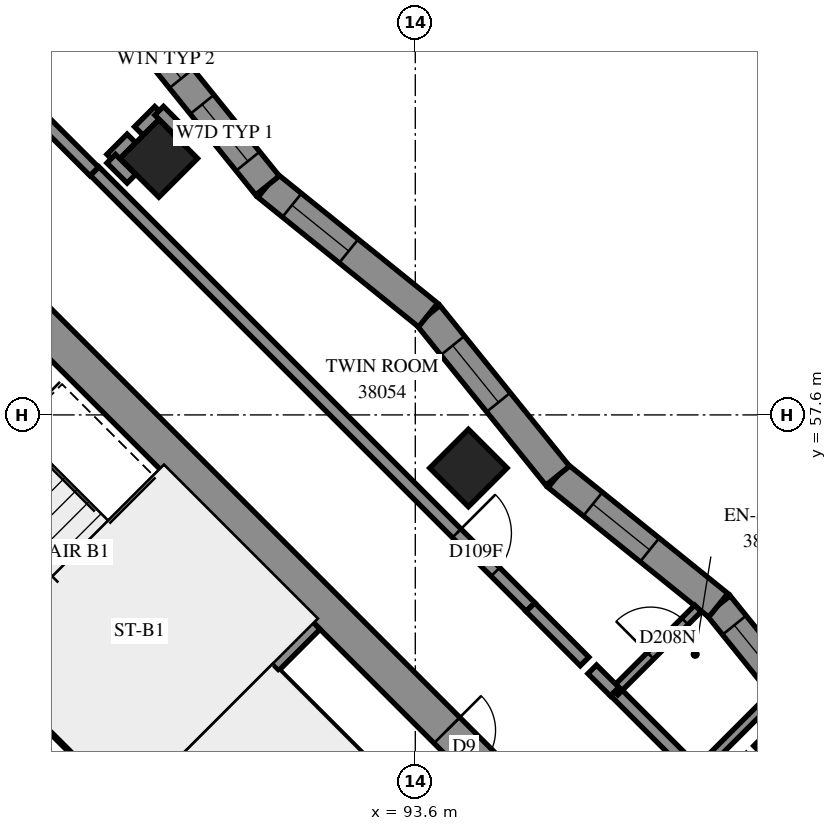
"""IFC4 building model, lengths in metres.
Left out: names, types, materials, properties, quantities, classifications, styles, units other than length and angle.
Written with IfcOpenShell. Run it as: python <this file> out.ifc"""

import sys

from ifc_helpers import new_model, si_unit, direction, frame, frame_2d, origin, origin_2d, place, context, subcontext, project, spatial, polyline, rectangle, outline, extrude, element, fill, save


model = new_model("IFC4")
c1 = context("Model", 3, precision=1e-05, world=origin(), true_north=direction((0.0, 1.0)))
c2 = subcontext(c1, "Body", "Model", "MODEL_VIEW")
j1 = project(units=[si_unit("LENGTHUNIT", "METRE"), si_unit("PLANEANGLEUNIT", "RADIAN")], contexts=[c1])
p1 = place(None, origin())
s1 = spatial("IfcSite", under=j1, at=p1, CompositionType="ELEMENT")
p2 = place(p1, origin())
s2 = spatial("IfcBuilding", under=s1, at=p2, CompositionType="ELEMENT")
p3 = place(p2, frame((0.0, 0.0, 142.2)))
s3 = spatial("IfcBuildingStorey", under=s2, at=p3, CompositionType="ELEMENT", Elevation=142.2)
for number, where, z_axis, x_axis in (
    (1, (89.382, 61.818, 0.0), (0.0, 0.0, 1.0), (0.707, -0.707, 0.0)),
    (2, (94.474, 56.727, 0.0), (0.0, 0.0, 1.0), (0.707, -0.707, 0.0)),
    (3, (99.565, 51.635, 0.0), (0.0, 0.0, 1.0), (0.707, -0.707, 0.0)),
):
    element("IfcColumn", number, at=place(p3, frame(where, z_axis=z_axis, x_axis=x_axis)), inside=s3, PredefinedType="COLUMN", context=c2, shape_type="SweptSolid", body=[
        extrude(rectangle(XDim=0.9, YDim=0.9, at=origin_2d()), origin(), (0.0, 0.0, 1.0), 3.1),
    ])
p4 = place(p3, frame((86.625, 59.908, -0.3), z_axis=(0.0, 0.0, 1.0), x_axis=(0.7071067812, -0.7071067812, 0.0)))
e4 = element("IfcWall", 4, at=p4, inside=s3, PredefinedType="SHEAR", context=c2, shape_type="SweptSolid", body=[
    extrude(rectangle(XDim=15.6, YDim=0.6, at=frame_2d((7.8, 0.0))), origin(), (0.0, 0.0, 1.0), 2.7),
])
p5 = place(p4, frame((10.6, 0.0, 0.3)))
e5 = element("IfcOpeningElement", 5, at=p5, cuts=e4, PredefinedType="OPENING", context=c2, shape_type="SweptSolid", body=[
    extrude(rectangle(XDim=0.8, YDim=2.1, at=frame_2d((0.4, 1.05))), frame((0.0, 0.31, 0.0), z_axis=(0.0, -1.0, 0.0), x_axis=(1.0, 0.0, 0.0)), (0.0, 0.0, 1.0), 0.62),
])
p6 = place(p3, frame((81.534, 53.969, 0.0), z_axis=(0.0, 0.0, 1.0), x_axis=(0.707103309, -0.7071102534, 0.0)))
e6 = element("IfcWall", 6, at=p6, inside=s3, PredefinedType="SOLIDWALL", context=c2, shape_type="SweptSolid", body=[
    extrude(rectangle(XDim=14.4, YDim=0.3, at=frame_2d((7.2, 0.0))), origin(), (0.0, 0.0, 1.0), 3.1),
])
p7 = place(p6, frame((1.25, 0.0, 0.0)))
e7 = element("IfcOpeningElement", 7, at=p7, cuts=e6, PredefinedType="OPENING", context=c2, shape_type="SweptSolid", body=[
    extrude(rectangle(XDim=1.1, YDim=2.1, at=frame_2d((0.55, 1.05))), frame((0.0, 0.16, 0.0), z_axis=(0.0, -1.0, 0.0), x_axis=(1.0, 0.0, 0.0)), (0.0, 0.0, 1.0), 0.32),
])
p8 = place(p6, frame((4.85, 0.0, 0.0)))
e8 = element("IfcOpeningElement", 8, at=p8, cuts=e6, PredefinedType="OPENING", context=c2, shape_type="SweptSolid", body=[
    extrude(rectangle(XDim=1.1, YDim=2.1, at=frame_2d((0.55, 1.05))), frame((0.0, 0.16, 0.0), z_axis=(0.0, -1.0, 0.0), x_axis=(1.0, 0.0, 0.0)), (0.0, 0.0, 1.0), 0.32),
])
p9 = place(p6, frame((8.45, 0.0, 0.0)))
e9 = element("IfcOpeningElement", 9, at=p9, cuts=e6, PredefinedType="OPENING", context=c2, shape_type="SweptSolid", body=[
    extrude(rectangle(XDim=1.1, YDim=2.1, at=frame_2d((0.55, 1.05))), frame((0.0, 0.16, 0.0), z_axis=(0.0, -1.0, 0.0), x_axis=(1.0, 0.0, 0.0)), (0.0, 0.0, 1.0), 0.32),
])
p10 = place(p6, frame((12.05, 0.0, 0.0)))
e10 = element("IfcOpeningElement", 10, at=p10, cuts=e6, PredefinedType="OPENING", context=c2, shape_type="SweptSolid", body=[
    extrude(rectangle(XDim=1.1, YDim=2.1, at=frame_2d((0.55, 1.05))), frame((0.0, 0.16, 0.0), z_axis=(0.0, -1.0, 0.0), x_axis=(1.0, 0.0, 0.0)), (0.0, 0.0, 1.0), 0.32),
])
p11 = place(p3, frame((83.867, 56.302, 0.0), z_axis=(0.0, 0.0, 1.0), x_axis=(0.7071137256, -0.7070998367, 0.0)))
e11 = element("IfcWall", 11, at=p11, inside=s3, PredefinedType="SOLIDWALL", context=c2, shape_type="SweptSolid", body=[
    extrude(rectangle(XDim=7.2, YDim=0.3, at=frame_2d((3.6, 0.0))), origin(), (0.0, 0.0, 1.0), 3.1),
])
p12 = place(p3, frame((88.958, 51.211, 0.0), z_axis=(0.0, 0.0, 1.0), x_axis=(0.7071067812, 0.7071067812, 0.0)))
e12 = element("IfcWall", 12, at=p12, inside=s3, PredefinedType="SOLIDWALL", context=c2, shape_type="SweptSolid", body=[
    extrude(rectangle(XDim=4.2, YDim=0.3, at=frame_2d((2.1, 0.0))), origin(), (0.0, 0.0, 1.0), 3.1),
])
p13 = place(p3, frame((100.714, 51.828, 0.0), z_axis=(0.0, 0.0, 1.0), x_axis=(-0.6278699325, 0.7783182818, 0.0)))
e13 = element("IfcWall", 13, at=p13, inside=s3, PredefinedType="SOLIDWALL", context=c2, shape_type="SweptSolid", body=[
    extrude(outline(polyline([(0.027, -0.25), (3.421, -0.25), (3.367, 0.25), (-0.027, 0.25), (0.027, -0.25)])), origin(), (0.0, 0.0, 1.0), 3.1),
])
p14 = place(p13, frame((1.774, 0.0, 0.45)))
e14 = element("IfcOpeningElement", 14, at=p14, cuts=e13, PredefinedType="OPENING", context=c2, shape_type="SweptSolid", body=[
    extrude(rectangle(XDim=1.2, YDim=2.5, at=frame_2d((0.6, 1.25))), frame((0.0, 0.26, 0.0), z_axis=(0.0, -1.0, 0.0), x_axis=(1.0, 0.0, 0.0)), (0.0, 0.0, 1.0), 0.52),
])
p15 = place(p3, frame((98.583, 54.469, 0.0), z_axis=(0.0, 0.0, 1.0), x_axis=(-0.7783182818, 0.6278699325, 0.0)))
e15 = element("IfcWall", 15, at=p15, inside=s3, PredefinedType="SOLIDWALL", context=c2, shape_type="SweptSolid", body=[
    extrude(outline(polyline([(-0.027, -0.25), (3.367, -0.25), (3.421, 0.25), (0.027, 0.25), (-0.027, -0.25)])), origin(), (0.0, 0.0, 1.0), 3.1),
])
p16 = place(p15, frame((1.45, 0.0, 0.45)))
e16 = element("IfcOpeningElement", 16, at=p16, cuts=e15, PredefinedType="OPENING", context=c2, shape_type="SweptSolid", body=[
    extrude(rectangle(XDim=1.2, YDim=2.5, at=frame_2d((0.6, 1.25))), frame((0.0, 0.26, 0.0), z_axis=(0.0, -1.0, 0.0), x_axis=(1.0, 0.0, 0.0)), (0.0, 0.0, 1.0), 0.52),
])
p17 = place(p3, frame((95.941, 56.6, 0.0), z_axis=(0.0, 0.0, 1.0), x_axis=(-0.6278699325, 0.7783182818, 0.0)))
e17 = element("IfcWall", 17, at=p17, inside=s3, PredefinedType="SOLIDWALL", context=c2, shape_type="SweptSolid", body=[
    extrude(outline(polyline([(0.027, -0.25), (3.421, -0.25), (3.367, 0.25), (-0.027, 0.25), (0.027, -0.25)])), origin(), (0.0, 0.0, 1.0), 3.1),
])
p18 = place(p17, frame((1.55, 0.0, 0.45)))
e18 = element("IfcOpeningElement", 18, at=p18, cuts=e17, PredefinedType="OPENING", context=c2, shape_type="SweptSolid", body=[
    extrude(rectangle(XDim=1.2, YDim=2.5, at=frame_2d((0.6, 1.25))), frame((0.0, 0.26, 0.0), z_axis=(0.0, -1.0, 0.0), x_axis=(1.0, 0.0, 0.0)), (0.0, 0.0, 1.0), 0.52),
])
p19 = place(p3, frame((93.81, 59.242, 0.0), z_axis=(0.0, 0.0, 1.0), x_axis=(-0.7783182818, 0.6278699325, 0.0)))
e19 = element("IfcWall", 19, at=p19, inside=s3, PredefinedType="SOLIDWALL", context=c2, shape_type="SweptSolid", body=[
    extrude(outline(polyline([(-0.027, -0.25), (3.367, -0.25), (3.421, 0.25), (0.027, 0.25), (-0.027, -0.25)])), origin(), (0.0, 0.0, 1.0), 3.1),
])
p20 = place(p19, frame((1.677, 0.0, 0.45)))
e20 = element("IfcOpeningElement", 20, at=p20, cuts=e19, PredefinedType="OPENING", context=c2, shape_type="SweptSolid", body=[
    extrude(rectangle(XDim=1.2, YDim=2.5, at=frame_2d((0.6, 1.25))), frame((0.0, 0.26, 0.0), z_axis=(0.0, -1.0, 0.0), x_axis=(1.0, 0.0, 0.0)), (0.0, 0.0, 1.0), 0.52),
])
p21 = place(p3, frame((91.169, 61.373, 0.0), z_axis=(0.0, 0.0, 1.0), x_axis=(-0.6278699325, 0.7783182818, 0.0)))
e21 = element("IfcWall", 21, at=p21, inside=s3, PredefinedType="SOLIDWALL", context=c2, shape_type="SweptSolid", body=[
    extrude(outline(polyline([(0.027, -0.25), (3.421, -0.25), (3.367, 0.25), (-0.027, 0.25), (0.027, -0.25)])), origin(), (0.0, 0.0, 1.0), 3.1),
])
p22 = place(p21, frame((0.512, 0.0, 0.5)))
e22 = element("IfcOpeningElement", 22, at=p22, cuts=e21, PredefinedType="OPENING", context=c2, shape_type="SweptSolid", body=[
    extrude(rectangle(XDim=1.2, YDim=2.45, at=frame_2d((0.6, 1.225))), frame((0.0, 0.26, 0.0), z_axis=(0.0, -1.0, 0.0), x_axis=(1.0, 0.0, 0.0)), (0.0, 0.0, 1.0), 0.52),
])
p23 = place(p21, frame((2.259, 0.0, 0.45)))
e23 = element("IfcOpeningElement", 23, at=p23, cuts=e21, PredefinedType="OPENING", context=c2, shape_type="SweptSolid", body=[
    extrude(rectangle(XDim=0.8, YDim=2.5, at=frame_2d((0.4, 1.25))), frame((0.0, 0.26, 0.0), z_axis=(0.0, -1.0, 0.0), x_axis=(1.0, 0.0, 0.0)), (0.0, 0.0, 1.0), 0.52),
])
p24 = place(p3, frame((91.313, 53.354, 0.0), z_axis=(0.0, 0.0, 1.0), x_axis=(0.7071140275, -0.7070995348, 0.0)))
e24 = element("IfcWall", 24, at=p24, inside=s3, PredefinedType="PARTITIONING", context=c2, shape_type="SweptSolid", body=[
    extrude(rectangle(XDim=6.9, YDim=0.15, at=frame_2d((3.45, 0.0))), origin(), (0.0, 0.0, 1.0), 3.1),
])
p25 = place(p3, frame((88.326, 61.609, 0.0), z_axis=(0.0, 0.0, 1.0), x_axis=(0.7071067812, -0.7071067812, 0.0)))
e25 = element("IfcWall", 25, at=p25, inside=s3, PredefinedType="PARTITIONING", context=c2, shape_type="SweptSolid", body=[
    extrude(rectangle(XDim=10.14, YDim=0.2, at=frame_2d((5.07, 0.0))), origin(), (0.0, 0.0, 1.0), 3.1),
])
p26 = place(p25, frame((8.422, 0.0, 0.0)))
e26 = element("IfcOpeningElement", 26, at=p26, cuts=e25, PredefinedType="OPENING", context=c2, shape_type="SweptSolid", body=[
    extrude(rectangle(XDim=0.9, YDim=2.1, at=frame_2d((0.45, 1.05))), frame((0.0, 0.11, 0.0), z_axis=(0.0, -1.0, 0.0), x_axis=(1.0, 0.0, 0.0)), (0.0, 0.0, 1.0), 0.22),
])
p27 = place(p3, frame((96.882, 53.053, 0.0), z_axis=(0.0, 0.0, 1.0), x_axis=(0.7071067812, -0.7071067812, 0.0)))
e27 = element("IfcWall", 27, at=p27, inside=s3, PredefinedType="PARTITIONING", context=c2, shape_type="SweptSolid", body=[
    extrude(rectangle(XDim=2.86, YDim=0.2, at=frame_2d((1.43, 0.0))), origin(), (0.0, 0.0, 1.0), 3.1),
])
p28 = place(p3, frame((86.834, 63.088, 0.0), z_axis=(0.0, 0.0, 1.0), x_axis=(0.7075827869, -0.7066304548, 0.0)))
e28 = element("IfcWall", 28, at=p28, inside=s3, PredefinedType="PARTITIONING", context=c2, shape_type="SweptSolid", body=[
    extrude(rectangle(XDim=2.1, YDim=0.2, at=frame_2d((1.05, 0.0))), origin(), (0.0, 0.0, 1.0), 3.1),
])
p29 = place(p3, frame((96.878, 53.05, 0.0), z_axis=(0.0, 0.0, 1.0), x_axis=(0.7076230681, 0.7065901171, 0.0)))
e29 = element("IfcWall", 29, at=p29, inside=s3, PredefinedType="PARTITIONING", context=c2, shape_type="SweptSolid", body=[
    extrude(rectangle(XDim=1.936, YDim=0.15, at=frame_2d((0.968, 0.0))), origin(), (0.0, 0.0, 1.0), 3.1),
])
p30 = place(p29, frame((0.834, 0.0, 0.0)))
e30 = element("IfcOpeningElement", 30, at=p30, cuts=e29, PredefinedType="OPENING", context=c2, shape_type="SweptSolid", body=[
    extrude(rectangle(XDim=0.8, YDim=2.1, at=frame_2d((0.4, 1.05))), frame((0.0, 0.085, 0.0), z_axis=(0.0, -1.0, 0.0), x_axis=(1.0, 0.0, 0.0)), (0.0, 0.0, 1.0), 0.17),
])
p31 = place(p3, frame((98.221, 51.707, 0.0), z_axis=(0.0, 0.0, 1.0), x_axis=(0.7071349331, 0.7070786281, 0.0)))
e31 = element("IfcWall", 31, at=p31, inside=s3, PredefinedType="PARTITIONING", context=c2, shape_type="SweptSolid", body=[
    extrude(rectangle(XDim=1.776, YDim=0.15, at=frame_2d((0.888, 0.0))), origin(), (0.0, 0.0, 1.0), 3.1),
])
p32 = place(p3, frame((95.494, 54.438, 0.0), z_axis=(0.0, 0.0, 1.0), x_axis=(0.706312726, -0.7078999456, 0.0)))
e32 = element("IfcWall", 32, at=p32, inside=s3, PredefinedType="PARTITIONING", context=c2, shape_type="SweptSolid", body=[
    extrude(rectangle(XDim=1.26, YDim=0.2, at=frame_2d((0.63, 0.0))), origin(), (0.0, 0.0, 1.0), 3.1),
])
p33 = place(p3, frame((96.51, 53.416, 0.0), z_axis=(0.0, 0.0, 1.0), x_axis=(0.7090308706, -0.7051774419, 0.0)))
e33 = element("IfcWall", 33, at=p33, inside=s3, PredefinedType="PARTITIONING", context=c2, shape_type="SweptSolid", body=[
    extrude(rectangle(XDim=0.519, YDim=0.2, at=frame_2d((0.26, 0.0))), origin(), (0.0, 0.0, 1.0), 3.1),
])
for number, where, z_axis, x_axis in (
    (34, (88.6, 61.814, 0.0), (0.0, 0.0, 1.0), (0.707, 0.707, 0.0)),
    (35, (89.054, 62.268, 0.0), (0.0, 0.0, 1.0), (0.707, 0.707, 0.0)),
):
    element("IfcWall", number, at=place(p3, frame(where, z_axis=z_axis, x_axis=x_axis)), inside=s3, PredefinedType="PARTITIONING", context=c2, shape_type="SweptSolid", body=[
        extrude(rectangle(XDim=0.469, YDim=0.2, at=frame_2d((0.235, 0.0))), origin(), (0.0, 0.0, 1.0), 3.1),
    ])
for number, where, z_axis, x_axis in (
    (36, (88.599, 61.813, 0.0), (0.0, 0.0, 1.0), (0.709, -0.705, 0.0)),
    (37, (89.388, 62.602, 0.0), (0.0, 0.0, 1.0), (0.705, -0.709, 0.0)),
):
    element("IfcWall", number, at=place(p3, frame(where, z_axis=z_axis, x_axis=x_axis)), inside=s3, PredefinedType="PARTITIONING", context=c2, shape_type="SweptSolid", body=[
        extrude(rectangle(XDim=0.468, YDim=0.2, at=frame_2d((0.234, 0.0))), origin(), (0.0, 0.0, 1.0), 3.1),
    ])
p34 = place(p3, frame((99.237, 52.087, 0.0), z_axis=(0.0, 0.0, 1.0), x_axis=(0.7071742693, 0.7070392866, 0.0)))
e38 = element("IfcWall", 38, at=p34, inside=s3, PredefinedType="PARTITIONING", context=c2, shape_type="SweptSolid", body=[
    extrude(rectangle(XDim=0.741, YDim=0.2, at=frame_2d((0.37, 0.0))), origin(), (0.0, 0.0, 1.0), 3.1),
])
p35 = place(p14, origin())
e39 = element("IfcWindow", 39, at=p35, inside=s3, PartitioningType="SINGLE_PANEL", PredefinedType="WINDOW", context=c2, shape_type="SweptSolid", body=[
    extrude(rectangle(XDim=1.2, YDim=2.5, at=frame_2d((0.6, 1.25))), frame((0.0, 0.18, 0.0), z_axis=(0.0, -1.0, 0.0), x_axis=(1.0, 0.0, 0.0)), (0.0, 0.0, 1.0), 0.06),
])
fill(e14, e39)
p36 = place(p16, origin())
e40 = element("IfcWindow", 40, at=p36, inside=s3, PartitioningType="SINGLE_PANEL", PredefinedType="WINDOW", context=c2, shape_type="SweptSolid", body=[
    extrude(rectangle(XDim=1.2, YDim=2.5, at=frame_2d((0.6, 1.25))), frame((0.0, 0.18, 0.0), z_axis=(0.0, -1.0, 0.0), x_axis=(1.0, 0.0, 0.0)), (0.0, 0.0, 1.0), 0.06),
])
fill(e16, e40)
p37 = place(p18, origin())
e41 = element("IfcWindow", 41, at=p37, inside=s3, PartitioningType="SINGLE_PANEL", PredefinedType="WINDOW", context=c2, shape_type="SweptSolid", body=[
    extrude(rectangle(XDim=1.2, YDim=2.5, at=frame_2d((0.6, 1.25))), frame((0.0, 0.18, 0.0), z_axis=(0.0, -1.0, 0.0), x_axis=(1.0, 0.0, 0.0)), (0.0, 0.0, 1.0), 0.06),
])
fill(e18, e41)
p38 = place(p20, origin())
e42 = element("IfcWindow", 42, at=p38, inside=s3, PartitioningType="SINGLE_PANEL", PredefinedType="WINDOW", context=c2, shape_type="SweptSolid", body=[
    extrude(rectangle(XDim=1.2, YDim=2.5, at=frame_2d((0.6, 1.25))), frame((0.0, 0.18, 0.0), z_axis=(0.0, -1.0, 0.0), x_axis=(1.0, 0.0, 0.0)), (0.0, 0.0, 1.0), 0.06),
])
fill(e20, e42)
p39 = place(p5, origin())
e43 = element("IfcDoor", 43, at=p39, inside=s3, OperationType="SINGLE_SWING_RIGHT", PredefinedType="DOOR", context=c2, shape_type="SweptSolid", body=[
    extrude(rectangle(XDim=0.8, YDim=2.1, at=frame_2d((0.4, 1.05))), frame((0.0, 0.025, 0.0), z_axis=(0.0, -1.0, 0.0), x_axis=(1.0, 0.0, 0.0)), (0.0, 0.0, 1.0), 0.05),
])
fill(e5, e43)
p40 = place(p26, origin())
e44 = element("IfcDoor", 44, at=p40, inside=s3, OperationType="SINGLE_SWING_LEFT", PredefinedType="DOOR", context=c2, shape_type="SweptSolid", body=[
    extrude(rectangle(XDim=0.9, YDim=2.1, at=frame_2d((0.45, 1.05))), frame((0.0, 0.025, 0.0), z_axis=(0.0, -1.0, 0.0), x_axis=(1.0, 0.0, 0.0)), (0.0, 0.0, 1.0), 0.05),
])
fill(e26, e44)
p41 = place(p30, origin())
e45 = element("IfcDoor", 45, at=p41, inside=s3, OperationType="SINGLE_SWING_RIGHT", PredefinedType="DOOR", context=c2, shape_type="SweptSolid", body=[
    extrude(rectangle(XDim=0.8, YDim=2.1, at=frame_2d((0.4, 1.05))), frame((0.0, 0.025, 0.0), z_axis=(0.0, -1.0, 0.0), x_axis=(1.0, 0.0, 0.0)), (0.0, 0.0, 1.0), 0.05),
])
fill(e30, e45)
p42 = place(p22, origin())
e46 = element("IfcWindow", 46, at=p42, inside=s3, PartitioningType="SINGLE_PANEL", PredefinedType="WINDOW", context=c2, shape_type="SweptSolid", body=[
    extrude(rectangle(XDim=1.2, YDim=2.45, at=frame_2d((0.6, 1.225))), frame((0.0, 0.18, 0.0), z_axis=(0.0, -1.0, 0.0), x_axis=(1.0, 0.0, 0.0)), (0.0, 0.0, 1.0), 0.06),
])
fill(e22, e46)
p43 = place(p23, origin())
e47 = element("IfcWindow", 47, at=p43, inside=s3, PartitioningType="SINGLE_PANEL", PredefinedType="WINDOW", context=c2, shape_type="SweptSolid", body=[
    extrude(rectangle(XDim=0.8, YDim=2.5, at=frame_2d((0.4, 1.25))), frame((0.0, 0.18, 0.0), z_axis=(0.0, -1.0, 0.0), x_axis=(1.0, 0.0, 0.0)), (0.0, 0.0, 1.0), 0.06),
])
fill(e23, e47)
save(model, sys.argv[1])
